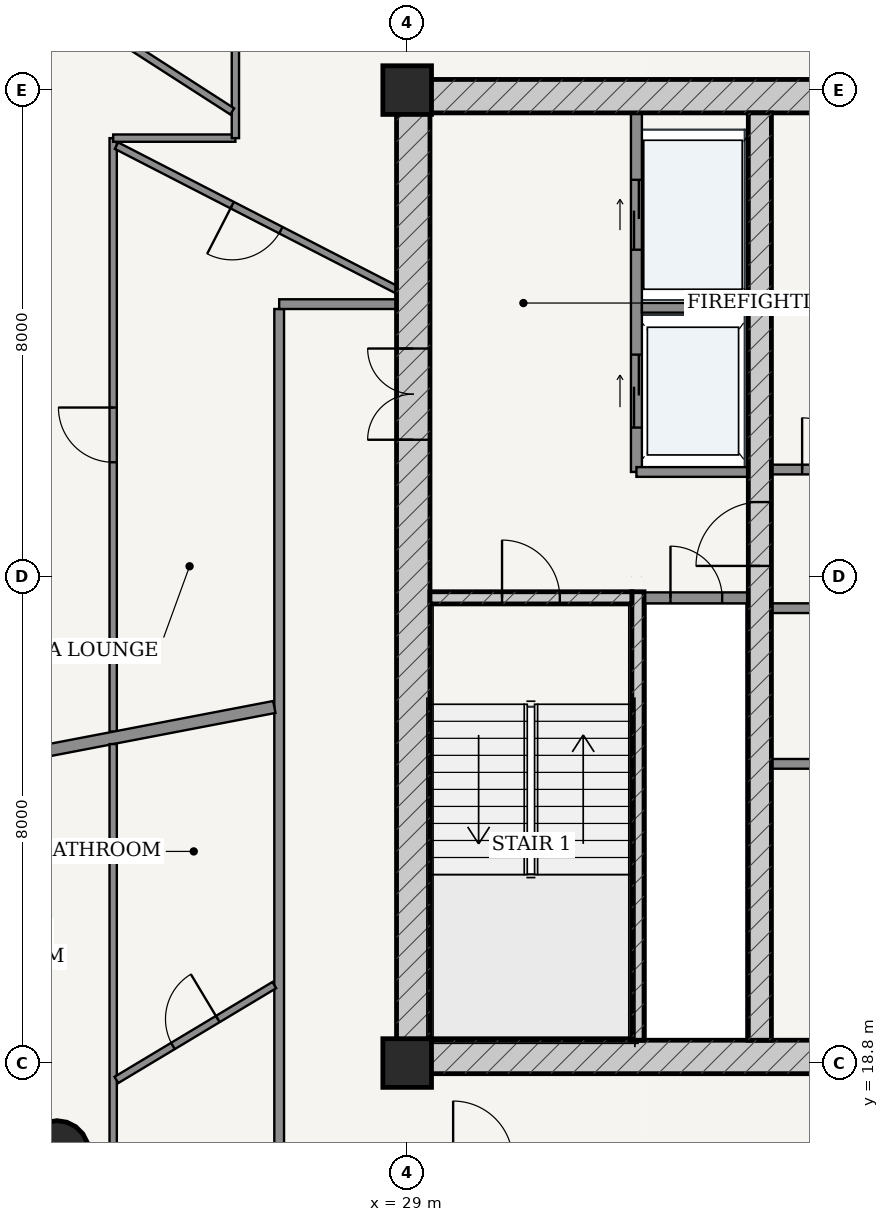
"""IFC4 building model, lengths in metres.
Left out: names, types, materials, properties, quantities, classifications, styles, units other than length and angle.
Written with IfcOpenShell. Run it as: python <this file> out.ifc"""

import sys

from ifc_helpers import new_model, si_unit, direction, frame, frame_2d, origin, origin_2d, place, context, subcontext, project, spatial, rectangle, hollow_circle, extrude, source, transform, mapped, element, fill, save


model = new_model("IFC4")
c1 = context("Model", 3, precision=1e-05, world=origin(), true_north=direction((-0.2419218956, 0.970295726276)))
c2 = subcontext(c1, "Body", "Model", "MODEL_VIEW")
j1 = project(units=[si_unit("LENGTHUNIT", "METRE"), si_unit("PLANEANGLEUNIT", "RADIAN")], contexts=[c1])
p1 = place(None, origin())
s1 = spatial("IfcSite", under=j1, at=p1, CompositionType="ELEMENT")
p2 = place(p1, origin())
s2 = spatial("IfcBuilding", under=s1, at=p2, CompositionType="ELEMENT")
p3 = place(p2, frame((0.0, 0.0, 251.95)))
s3 = spatial("IfcBuildingStorey", under=s2, at=p3, CompositionType="ELEMENT", Elevation=251.95)
for number, where, z_axis, x_axis in (
    (1, (29.0, 18.8, 0.0), (0.0, 0.0, 1.0), (1.0, 0.0, 0.0)),
    (2, (29.0, 34.8, 0.0), (0.0, 0.0, 1.0), (1.0, 0.0, 0.0)),
):
    element("IfcColumn", number, at=place(p3, frame(where, z_axis=z_axis, x_axis=x_axis)), inside=s3, PredefinedType="COLUMN", context=c2, shape_type="SweptSolid", body=[
        extrude(rectangle(XDim=0.8, YDim=0.8, at=origin_2d()), origin(), (0.0, 0.0, 1.0), 3.75),
    ])
p4 = place(p3, frame((28.825, 18.9, 0.0), z_axis=(0.0, 0.0, 1.0), x_axis=(1.0, 0.0, 0.0)))
e3 = element("IfcWall", 3, at=p4, inside=s3, PredefinedType="SHEAR", context=c2, shape_type="SweptSolid", body=[
    extrude(rectangle(XDim=18.35, YDim=0.55, at=frame_2d((9.175, 0.0))), origin(), (0.0, 0.0, 1.0), 3.49),
])
p5 = place(p4, frame((7.41, 0.0, 0.0)))
e4 = element("IfcOpeningElement", 4, at=p5, cuts=e3, PredefinedType="OPENING", context=c2, shape_type="SweptSolid", body=[
    extrude(rectangle(XDim=0.85, YDim=2.1, at=frame_2d((0.425, 1.05))), frame((0.0, 0.285, 0.0), z_axis=(0.0, -1.0, 0.0), x_axis=(1.0, 0.0, 0.0)), (0.0, 0.0, 1.0), 0.57),
])
p6 = place(p4, frame((10.49, 0.0, 0.0)))
e5 = element("IfcOpeningElement", 5, at=p6, cuts=e3, PredefinedType="OPENING", context=c2, shape_type="SweptSolid", body=[
    extrude(rectangle(XDim=0.85, YDim=2.1, at=frame_2d((0.425, 1.05))), frame((0.0, 0.285, 0.0), z_axis=(0.0, -1.0, 0.0), x_axis=(1.0, 0.0, 0.0)), (0.0, 0.0, 1.0), 0.57),
])
p7 = place(p3, frame((28.825, 34.7, 0.0), z_axis=(0.0, 0.0, 1.0), x_axis=(1.0, 0.0, 0.0)))
e6 = element("IfcWall", 6, at=p7, inside=s3, PredefinedType="SHEAR", context=c2, shape_type="SweptSolid", body=[
    extrude(rectangle(XDim=18.35, YDim=0.55, at=frame_2d((9.175, 0.0))), origin(), (0.0, 0.0, 1.0), 3.49),
])
p8 = place(p3, frame((29.1, 19.175, 0.0), z_axis=(0.0, 0.0, 1.0), x_axis=(0.0, 1.0, 0.0)))
e7 = element("IfcWall", 7, at=p8, inside=s3, PredefinedType="SHEAR", context=c2, shape_type="SweptSolid", body=[
    extrude(rectangle(XDim=15.25, YDim=0.55, at=frame_2d((7.625, 0.0))), origin(), (0.0, 0.0, 1.0), 3.49),
])
p9 = place(p8, frame((9.875, 0.0, 0.0)))
e8 = element("IfcOpeningElement", 8, at=p9, cuts=e7, PredefinedType="OPENING", context=c2, shape_type="SweptSolid", body=[
    extrude(rectangle(XDim=1.5, YDim=2.2, at=frame_2d((0.75, 1.1))), frame((0.0, 0.285, 0.0), z_axis=(0.0, -1.0, 0.0), x_axis=(1.0, 0.0, 0.0)), (0.0, 0.0, 1.0), 0.57),
])
p10 = place(p3, frame((32.795, 19.175, 0.0), z_axis=(0.0, 0.0, 1.0), x_axis=(0.0, 1.0, 0.0)))
e9 = element("IfcWall", 9, at=p10, inside=s3, PredefinedType="SOLIDWALL", context=c2, shape_type="SweptSolid", body=[
    extrude(rectangle(XDim=7.375, YDim=0.2, at=frame_2d((3.688, 0.0))), origin(), (0.0, 0.0, 1.0), 3.49),
])
p11 = place(p3, frame((29.375, 26.45, 0.0), z_axis=(0.0, 0.0, 1.0), x_axis=(1.0, 0.0, 0.0)))
e10 = element("IfcWall", 10, at=p11, inside=s3, PredefinedType="SOLIDWALL", context=c2, shape_type="SweptSolid", body=[
    extrude(rectangle(XDim=3.32, YDim=0.2, at=frame_2d((1.66, 0.0))), origin(), (0.0, 0.0, 1.0), 3.49),
])
p12 = place(p11, frame((1.185, 0.0, 0.0)))
e11 = element("IfcOpeningElement", 11, at=p12, cuts=e10, PredefinedType="OPENING", context=c2, shape_type="SweptSolid", body=[
    extrude(rectangle(XDim=0.95, YDim=2.15, at=frame_2d((0.475, 1.075))), frame((0.0, 0.11, 0.0), z_axis=(0.0, -1.0, 0.0), x_axis=(1.0, 0.0, 0.0)), (0.0, 0.0, 1.0), 0.22),
])
p13 = place(p3, frame((34.8, 19.175, 0.0), z_axis=(0.0, 0.0, 1.0), x_axis=(0.0, 1.0, 0.0)))
e12 = element("IfcWall", 12, at=p13, inside=s3, PredefinedType="SHEAR", context=c2, shape_type="SweptSolid", body=[
    extrude(rectangle(XDim=15.25, YDim=0.38, at=frame_2d((7.625, 0.0))), origin(), (0.0, 0.0, 1.0), 3.49),
])
p14 = place(p13, frame((7.8, 0.0, 0.0)))
e13 = element("IfcOpeningElement", 13, at=p14, cuts=e12, PredefinedType="OPENING", context=c2, shape_type="SweptSolid", body=[
    extrude(rectangle(XDim=1.05, YDim=2.15, at=frame_2d((0.525, 1.075))), frame((0.0, 0.2, 0.0), z_axis=(0.0, -1.0, 0.0), x_axis=(1.0, 0.0, 0.0)), (0.0, 0.0, 1.0), 0.4),
])
p15 = place(p3, frame((23.241, 17.328, 0.0), z_axis=(0.0, 0.0, 1.0), x_axis=(1.0, 0.0, 0.0)))
e14 = element("IfcColumn", 14, at=p15, inside=s3, PredefinedType="COLUMN", context=c2, shape_type="SweptSolid", body=[
    extrude(hollow_circle(Radius=0.525, WallThickness=0.035, at=origin_2d()), origin(), (0.0, 0.0, 1.0), 3.75),
])
p16 = place(p3, frame((32.9, 26.45, 0.0), z_axis=(0.0, 0.0, 1.0), x_axis=(1.0, 0.0, 0.0)))
e15 = element("IfcWall", 15, at=p16, inside=s3, PredefinedType="PARTITIONING", context=c2, shape_type="SweptSolid", body=[
    extrude(rectangle(XDim=1.71, YDim=0.18, at=frame_2d((0.855, 0.0))), origin(), (0.0, 0.0, 1.0), 3.49),
])
p17 = place(p16, frame((0.43, 0.0, 0.0)))
e16 = element("IfcOpeningElement", 16, at=p17, cuts=e15, PredefinedType="OPENING", context=c2, shape_type="SweptSolid", body=[
    extrude(rectangle(XDim=0.85, YDim=2.1, at=frame_2d((0.425, 1.05))), frame((0.0, 0.1, 0.0), z_axis=(0.0, -1.0, 0.0), x_axis=(1.0, 0.0, 0.0)), (0.0, 0.0, 1.0), 0.2),
])
p18 = place(p3, frame((32.77, 28.52, 0.0), z_axis=(0.0, 0.0, 1.0), x_axis=(0.0, 1.0, 0.0)))
e17 = element("IfcWall", 17, at=p18, inside=s3, PredefinedType="PARTITIONING", context=c2, shape_type="SweptSolid", body=[
    extrude(rectangle(XDim=5.905, YDim=0.18, at=frame_2d((2.953, 0.0))), origin(), (0.0, 0.0, 1.0), 3.49),
])
p19 = place(p18, frame((3.655, 0.0, 0.0)))
e18 = element("IfcOpeningElement", 18, at=p19, cuts=e17, PredefinedType="OPENING", context=c2, shape_type="SweptSolid", body=[
    extrude(rectangle(XDim=1.15, YDim=2.2, at=frame_2d((0.575, 1.1))), frame((0.0, 0.1, 0.0), z_axis=(0.0, -1.0, 0.0), x_axis=(1.0, 0.0, 0.0)), (0.0, 0.0, 1.0), 0.2),
])
p20 = place(p18, frame((0.73, 0.0, 0.0)))
e19 = element("IfcOpeningElement", 19, at=p20, cuts=e17, PredefinedType="OPENING", context=c2, shape_type="SweptSolid", body=[
    extrude(rectangle(XDim=1.2, YDim=2.25, at=frame_2d((0.6, 1.125))), frame((0.0, 0.1, 0.0), z_axis=(0.0, -1.0, 0.0), x_axis=(1.0, 0.0, 0.0)), (0.0, 0.0, 1.0), 0.2),
])
p21 = place(p3, frame((32.86, 31.22, 0.0), z_axis=(0.0, 0.0, 1.0), x_axis=(1.0, 0.0, 0.0)))
e20 = element("IfcWall", 20, at=p21, inside=s3, PredefinedType="PARTITIONING", context=c2, shape_type="SweptSolid", body=[
    extrude(rectangle(XDim=1.75, YDim=0.16, at=frame_2d((0.875, 0.0))), origin(), (0.0, 0.0, 1.0), 3.49),
])
p22 = place(p3, frame((32.77, 28.52, 0.0), z_axis=(0.0, 0.0, 1.0), x_axis=(1.0, 0.0, 0.0)))
e21 = element("IfcWall", 21, at=p22, inside=s3, PredefinedType="PARTITIONING", context=c2, shape_type="SweptSolid", body=[
    extrude(rectangle(XDim=1.84, YDim=0.16, at=frame_2d((0.92, 0.0))), origin(), (0.0, 0.0, 1.0), 3.49),
])
p23 = place(p3, frame((34.99, 28.56, 0.0), z_axis=(0.0, 0.0, 1.0), x_axis=(1.0, 0.0, 0.0)))
e22 = element("IfcWall", 22, at=p23, inside=s3, PredefinedType="PARTITIONING", context=c2, shape_type="SweptSolid", body=[
    extrude(rectangle(XDim=6.02, YDim=0.16, at=frame_2d((3.01, 0.0))), origin(), (0.0, 0.0, 1.0), 3.49),
])
p24 = place(p23, frame((0.505, 0.0, 0.0)))
e23 = element("IfcOpeningElement", 23, at=p24, cuts=e22, PredefinedType="OPENING", context=c2, shape_type="SweptSolid", body=[
    extrude(rectangle(XDim=0.85, YDim=2.1, at=frame_2d((0.425, 1.05))), frame((0.0, 0.09, 0.0), z_axis=(0.0, -1.0, 0.0), x_axis=(1.0, 0.0, 0.0)), (0.0, 0.0, 1.0), 0.18),
])
p25 = place(p23, frame((2.58, 0.0, 0.0)))
e24 = element("IfcOpeningElement", 24, at=p25, cuts=e22, PredefinedType="OPENING", context=c2, shape_type="SweptSolid", body=[
    extrude(rectangle(XDim=0.86, YDim=2.1, at=frame_2d((0.43, 1.05))), frame((0.0, 0.09, 0.0), z_axis=(0.0, -1.0, 0.0), x_axis=(1.0, 0.0, 0.0)), (0.0, 0.0, 1.0), 0.18),
])
p26 = place(p23, frame((4.665, 0.0, 0.0)))
e25 = element("IfcOpeningElement", 25, at=p26, cuts=e22, PredefinedType="OPENING", context=c2, shape_type="SweptSolid", body=[
    extrude(rectangle(XDim=0.85, YDim=2.1, at=frame_2d((0.425, 1.05))), frame((0.0, 0.09, 0.0), z_axis=(0.0, -1.0, 0.0), x_axis=(1.0, 0.0, 0.0)), (0.0, 0.0, 1.0), 0.18),
])
p27 = place(p3, frame((34.99, 26.28, 0.0), z_axis=(0.0, 0.0, 1.0), x_axis=(1.0, 0.0, 0.0)))
e26 = element("IfcWall", 26, at=p27, inside=s3, PredefinedType="PARTITIONING", context=c2, shape_type="SweptSolid", body=[
    extrude(rectangle(XDim=6.02, YDim=0.16, at=frame_2d((3.01, 0.0))), origin(), (0.0, 0.0, 1.0), 3.49),
])
p28 = place(p27, frame((1.045, 0.0, 0.0)))
e27 = element("IfcOpeningElement", 27, at=p28, cuts=e26, PredefinedType="OPENING", context=c2, shape_type="SweptSolid", body=[
    extrude(rectangle(XDim=0.85, YDim=2.1, at=frame_2d((0.425, 1.05))), frame((0.0, 0.09, 0.0), z_axis=(0.0, -1.0, 0.0), x_axis=(1.0, 0.0, 0.0)), (0.0, 0.0, 1.0), 0.18),
])
p29 = place(p27, frame((3.215, 0.0, 0.0)))
e28 = element("IfcOpeningElement", 28, at=p29, cuts=e26, PredefinedType="OPENING", context=c2, shape_type="SweptSolid", body=[
    extrude(rectangle(XDim=1.1, YDim=2.2, at=frame_2d((0.55, 1.1))), frame((0.0, 0.09, 0.0), z_axis=(0.0, -1.0, 0.0), x_axis=(1.0, 0.0, 0.0)), (0.0, 0.0, 1.0), 0.18),
])
p30 = place(p27, frame((4.695, 0.0, 0.0)))
e29 = element("IfcOpeningElement", 29, at=p30, cuts=e26, PredefinedType="OPENING", context=c2, shape_type="SweptSolid", body=[
    extrude(rectangle(XDim=1.1, YDim=2.2, at=frame_2d((0.55, 1.1))), frame((0.0, 0.09, 0.0), z_axis=(0.0, -1.0, 0.0), x_axis=(1.0, 0.0, 0.0)), (0.0, 0.0, 1.0), 0.18),
])
p31 = place(p3, frame((34.99, 23.72, 0.0), z_axis=(0.0, 0.0, 1.0), x_axis=(1.0, 0.0, 0.0)))
e30 = element("IfcWall", 30, at=p31, inside=s3, PredefinedType="PARTITIONING", context=c2, shape_type="SweptSolid", body=[
    extrude(rectangle(XDim=6.02, YDim=0.16, at=frame_2d((3.01, 0.0))), origin(), (0.0, 0.0, 1.0), 3.49),
])
p32 = place(p3, frame((26.895, 17.275, 0.0), z_axis=(0.0, 0.0, 1.0), x_axis=(0.0, 1.0, 0.0)))
e31 = element("IfcWall", 31, at=p32, inside=s3, PredefinedType="PARTITIONING", context=c2, shape_type="SweptSolid", body=[
    extrude(rectangle(XDim=13.925, YDim=0.16, at=frame_2d((6.962, 0.0))), origin(), (0.0, 0.0, 1.0), 3.015),
])
p33 = place(p3, frame((26.895, 31.28, 0.0), z_axis=(0.0, 0.0, 1.0), x_axis=(1.0, 0.0, 0.0)))
e32 = element("IfcWall", 32, at=p33, inside=s3, PredefinedType="PARTITIONING", context=c2, shape_type="SweptSolid", body=[
    extrude(rectangle(XDim=1.93, YDim=0.16, at=frame_2d((0.965, 0.0))), origin(), (0.0, 0.0, 1.0), 3.49),
])
p34 = place(p3, frame((24.165, 24.249, 0.0), z_axis=(0.0, 0.0, 1.0), x_axis=(0.0, 1.0, 0.0)))
e33 = element("IfcWall", 33, at=p34, inside=s3, PredefinedType="PARTITIONING", context=c2, shape_type="SweptSolid", body=[
    extrude(rectangle(XDim=9.761, YDim=0.12, at=frame_2d((4.88, 0.0))), origin(), (0.0, 0.0, 1.0), 3.015),
])
p35 = place(p34, frame((4.43, 0.0, 0.0)))
e34 = element("IfcOpeningElement", 34, at=p35, cuts=e33, PredefinedType="OPENING", context=c2, shape_type="SweptSolid", body=[
    extrude(rectangle(XDim=0.9, YDim=2.15, at=frame_2d((0.45, 1.075))), frame((0.0, 0.07, 0.0), z_axis=(0.0, -1.0, 0.0), x_axis=(1.0, 0.0, 0.0)), (0.0, 0.0, 1.0), 0.14),
])
p36 = place(p3, frame((24.165, 34.01, 0.0), z_axis=(0.0, 0.0, 1.0), x_axis=(1.0, 0.0, 0.0)))
e35 = element("IfcWall", 35, at=p36, inside=s3, PredefinedType="PARTITIONING", context=c2, shape_type="SweptSolid", body=[
    extrude(rectangle(XDim=2.01, YDim=0.12, at=frame_2d((1.005, 0.0))), origin(), (0.0, 0.0, 1.0), 3.209),
])
p37 = place(p3, frame((26.175, 34.01, 0.0), z_axis=(0.0, 0.0, 1.0), x_axis=(0.0, 1.0, 0.0)))
e36 = element("IfcWall", 36, at=p37, inside=s3, PredefinedType="PARTITIONING", context=c2, shape_type="SweptSolid", body=[
    extrude(rectangle(XDim=3.615, YDim=0.12, at=frame_2d((1.808, 0.0))), origin(), (0.0, 0.0, 1.0), 3.015),
])
p38 = place(p3, frame((26.123, 34.45, 0.0), z_axis=(0.0, 0.0, 1.0), x_axis=(-0.840703033126, 0.541496454367, 0.0)))
e37 = element("IfcWall", 37, at=p38, inside=s3, PredefinedType="PARTITIONING", context=c2, shape_type="SweptSolid", body=[
    extrude(rectangle(XDim=4.958, YDim=0.12, at=frame_2d((2.479, 0.0))), origin(), (0.0, 0.0, 1.0), 3.015),
])
p39 = place(p3, frame((28.825, 31.518, 0.0), z_axis=(0.0, 0.0, 1.0), x_axis=(-0.889305882583, 0.457312854842, 0.0)))
e38 = element("IfcWall", 38, at=p39, inside=s3, PredefinedType="PARTITIONING", context=c2, shape_type="SweptSolid", body=[
    extrude(rectangle(XDim=5.178, YDim=0.12, at=frame_2d((2.589, 0.0))), origin(), (0.0, 0.0, 1.0), 3.209),
])
p40 = place(p39, frame((2.139, 0.0, 0.0)))
e39 = element("IfcOpeningElement", 39, at=p40, cuts=e38, PredefinedType="OPENING", context=c2, shape_type="SweptSolid", body=[
    extrude(rectangle(XDim=0.9, YDim=2.15, at=frame_2d((0.45, 1.075))), frame((0.0, 0.07, 0.0), z_axis=(0.0, -1.0, 0.0), x_axis=(1.0, 0.0, 0.0)), (0.0, 0.0, 1.0), 0.14),
])
p41 = place(p3, frame((26.815, 24.656, 0.0), z_axis=(0.0, 0.0, 1.0), x_axis=(-0.982109889803, -0.188308694305, 0.0)))
e40 = element("IfcWall", 40, at=p41, inside=s3, PredefinedType="PARTITIONING", context=c2, shape_type="SweptSolid", body=[
    extrude(rectangle(XDim=7.884, YDim=0.2, at=frame_2d((3.942, 0.0))), origin(), (0.0, 0.0, 1.0), 3.015),
])
p42 = place(p3, frame((24.165, 14.465, 0.0), z_axis=(0.0, 0.0, 1.0), x_axis=(0.0, 1.0, 0.0)))
e41 = element("IfcWall", 41, at=p42, inside=s3, PredefinedType="PARTITIONING", context=c2, shape_type="SweptSolid", body=[
    extrude(rectangle(XDim=9.58, YDim=0.12, at=frame_2d((4.79, 0.0))), origin(), (0.0, 0.0, 1.0), 3.015),
])
p43 = place(p42, frame((0.879, 0.0, 0.0)))
e42 = element("IfcOpeningElement", 42, at=p43, cuts=e41, PredefinedType="OPENING", context=c2, shape_type="SweptSolid", body=[
    extrude(rectangle(XDim=0.9, YDim=2.15, at=frame_2d((0.45, 1.075))), frame((0.0, 0.07, 0.0), z_axis=(0.0, -1.0, 0.0), x_axis=(1.0, 0.0, 0.0)), (0.0, 0.0, 1.0), 0.14),
])
p44 = place(p3, frame((26.815, 20.082, 0.0), z_axis=(0.0, 0.0, 1.0), x_axis=(-0.857265264382, -0.514875000834, 0.0)))
e43 = element("IfcWall", 43, at=p44, inside=s3, PredefinedType="PARTITIONING", context=c2, shape_type="SweptSolid", body=[
    extrude(rectangle(XDim=3.029, YDim=0.12, at=frame_2d((1.515, 0.0))), origin(), (0.0, 0.0, 1.0), 3.209),
])
p45 = place(p44, frame((1.085, 0.0, 0.0)))
e44 = element("IfcOpeningElement", 44, at=p45, cuts=e43, PredefinedType="OPENING", context=c2, shape_type="SweptSolid", body=[
    extrude(rectangle(XDim=0.86, YDim=2.15, at=frame_2d((0.43, 1.075))), frame((0.0, 0.07, 0.0), z_axis=(0.0, -1.0, 0.0), x_axis=(1.0, 0.0, 0.0)), (0.0, 0.0, 1.0), 0.14),
])
m1 = source(origin(), c2, "Body", "SweptSolid", [
    extrude(rectangle(XDim=1.5, YDim=2.2, at=frame_2d((0.75, 1.1))), frame((0.0, 0.025, 0.0), z_axis=(0.0, -1.0, 0.0), x_axis=(1.0, 0.0, 0.0)), (0.0, 0.0, 1.0), 0.05),
])
p46 = place(p9, origin())
e45 = element("IfcDoor", 45, at=p46, inside=s3, OperationType="DOUBLE_DOOR_SINGLE_SWING", PredefinedType="DOOR", context=c2, shape_type="MappedRepresentation", body=[
    mapped(m1, transform((0.0, 0.0, 0.0), scale=1.0)),
])
fill(e8, e45)
m2 = source(origin(), c2, "Body", "SweptSolid", [
    extrude(rectangle(XDim=1.05, YDim=2.15, at=frame_2d((0.525, 1.075))), frame((0.0, 0.025, 0.0), z_axis=(0.0, -1.0, 0.0), x_axis=(1.0, 0.0, 0.0)), (0.0, 0.0, 1.0), 0.05),
])
p47 = place(p14, origin())
e46 = element("IfcDoor", 46, at=p47, inside=s3, OperationType="SINGLE_SWING_LEFT", PredefinedType="DOOR", context=c2, shape_type="MappedRepresentation", body=[
    mapped(m2, transform((0.0, 0.0, 0.0), scale=1.0)),
])
fill(e13, e46)
m3 = source(origin(), c2, "Body", "SweptSolid", [
    extrude(rectangle(XDim=0.95, YDim=2.15, at=frame_2d((0.475, 1.075))), frame((0.0, 0.025, 0.0), z_axis=(0.0, -1.0, 0.0), x_axis=(1.0, 0.0, 0.0)), (0.0, 0.0, 1.0), 0.05),
])
p48 = place(p12, origin())
e47 = element("IfcDoor", 47, at=p48, inside=s3, OperationType="SINGLE_SWING_LEFT", PredefinedType="DOOR", context=c2, shape_type="MappedRepresentation", body=[
    mapped(m3, transform((0.0, 0.0, 0.0), scale=1.0)),
])
fill(e11, e47)
m4 = source(origin(), c2, "Body", "SweptSolid", [
    extrude(rectangle(XDim=0.85, YDim=2.1, at=frame_2d((0.425, 1.05))), frame((0.0, 0.025, 0.0), z_axis=(0.0, -1.0, 0.0), x_axis=(1.0, 0.0, 0.0)), (0.0, 0.0, 1.0), 0.05),
])
p49 = place(p17, origin())
e48 = element("IfcDoor", 48, at=p49, inside=s3, OperationType="SINGLE_SWING_LEFT", PredefinedType="DOOR", context=c2, shape_type="MappedRepresentation", body=[
    mapped(m4, transform((0.0, 0.0, 0.0), scale=1.0)),
])
fill(e16, e48)
p50 = place(p24, origin())
e49 = element("IfcDoor", 49, at=p50, inside=s3, OperationType="SINGLE_SWING_LEFT", PredefinedType="DOOR", context=c2, shape_type="MappedRepresentation", body=[
    mapped(m4, transform((0.0, 0.0, 0.0), scale=1.0)),
])
fill(e23, e49)
m5 = source(origin(), c2, "Body", "SweptSolid", [
    extrude(rectangle(XDim=1.15, YDim=2.2, at=frame_2d((0.575, 1.1))), frame((0.0, 0.025, 0.0), z_axis=(0.0, -1.0, 0.0), x_axis=(1.0, 0.0, 0.0)), (0.0, 0.0, 1.0), 0.05),
])
p51 = place(p19, origin())
e50 = element("IfcDoor", 50, at=p51, inside=s3, OperationType="DOUBLE_DOOR_SLIDING", PredefinedType="DOOR", context=c2, shape_type="MappedRepresentation", body=[
    mapped(m5, transform((0.0, 0.0, 0.0), scale=1.0)),
])
fill(e18, e50)
m6 = source(origin(), c2, "Body", "SweptSolid", [
    extrude(rectangle(XDim=1.2, YDim=2.25, at=frame_2d((0.6, 1.125))), frame((0.0, 0.025, 0.0), z_axis=(0.0, -1.0, 0.0), x_axis=(1.0, 0.0, 0.0)), (0.0, 0.0, 1.0), 0.05),
])
p52 = place(p20, origin())
e51 = element("IfcDoor", 51, at=p52, inside=s3, OperationType="DOUBLE_DOOR_SLIDING", PredefinedType="DOOR", context=c2, shape_type="MappedRepresentation", body=[
    mapped(m6, transform((0.0, 0.0, 0.0), scale=1.0)),
])
fill(e19, e51)
m7 = source(origin(), c2, "Body", "SweptSolid", [
    extrude(rectangle(XDim=0.9, YDim=2.15, at=frame_2d((0.45, 1.075))), frame((0.0, 0.025, 0.0), z_axis=(0.0, -1.0, 0.0), x_axis=(1.0, 0.0, 0.0)), (0.0, 0.0, 1.0), 0.05),
])
p53 = place(p40, origin())
e52 = element("IfcDoor", 52, at=p53, inside=s3, OperationType="SINGLE_SWING_RIGHT", PredefinedType="DOOR", context=c2, shape_type="MappedRepresentation", body=[
    mapped(m7, transform((0.0, 0.0, 0.0), scale=1.0)),
])
fill(e39, e52)
p54 = place(p35, origin())
e53 = element("IfcDoor", 53, at=p54, inside=s3, OperationType="SINGLE_SWING_RIGHT", PredefinedType="DOOR", context=c2, shape_type="MappedRepresentation", body=[
    mapped(m7, transform((0.0, 0.0, 0.0), scale=1.0)),
])
fill(e34, e53)
m8 = source(origin(), c2, "Body", "SweptSolid", [
    extrude(rectangle(XDim=0.86, YDim=2.15, at=frame_2d((0.43, 1.075))), frame((0.0, 0.025, 0.0), z_axis=(0.0, -1.0, 0.0), x_axis=(1.0, 0.0, 0.0)), (0.0, 0.0, 1.0), 0.05),
])
p55 = place(p45, frame((0.86, 0.0, 0.0), z_axis=(0.0, 0.0, 1.0), x_axis=(-1.0, 0.0, 0.0)))
e54 = element("IfcDoor", 54, at=p55, inside=s3, OperationType="SINGLE_SWING_RIGHT", PredefinedType="DOOR", context=c2, shape_type="MappedRepresentation", body=[
    mapped(m8, transform((0.0, 0.0, 0.0), scale=1.0)),
])
fill(e44, e54)
save(model, sys.argv[1])
